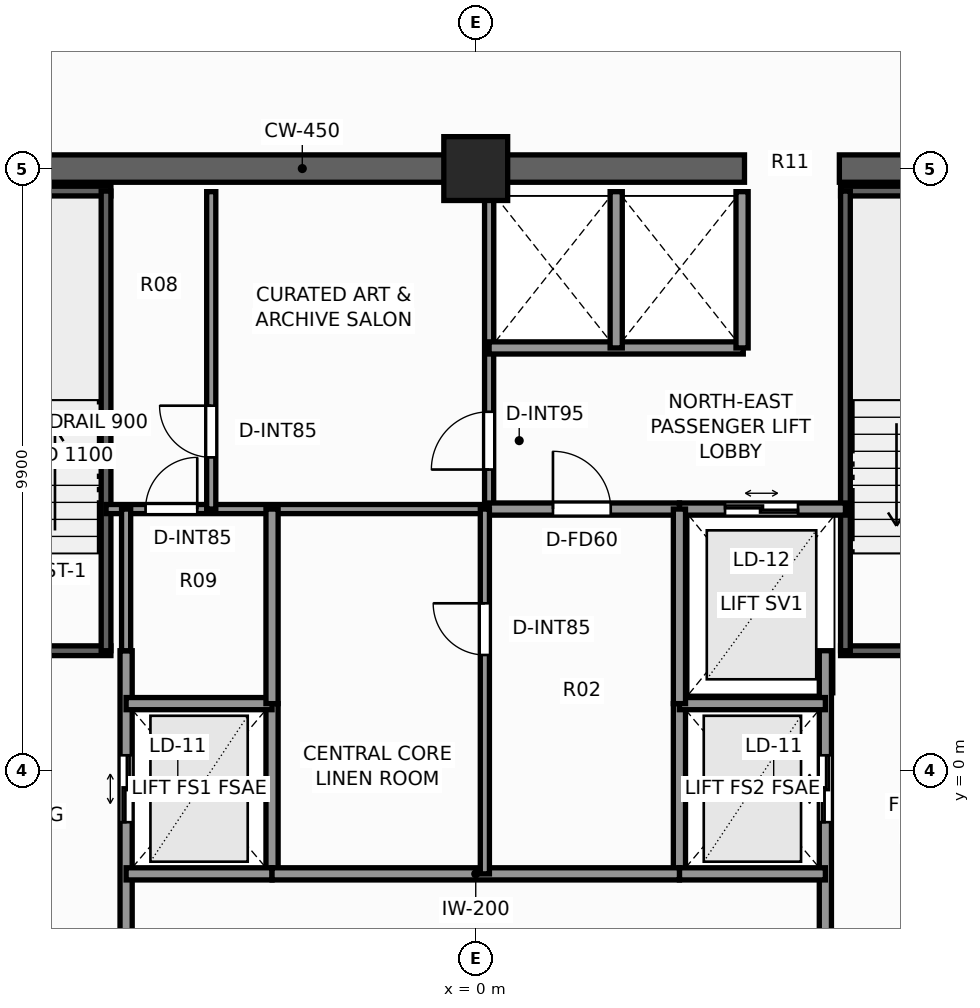
"""IFC4 building model, lengths in metres.
Left out: names, types, materials, properties, quantities, classifications, styles, units other than length and angle.
Written with IfcOpenShell. Run it as: python <this file> out.ifc"""

import sys

from ifc_helpers import new_model, si_unit, direction, frame, frame_2d, origin, origin_2d, place, context, subcontext, project, spatial, rectangle, extrude, element, fill, save


model = new_model("IFC4")
c1 = context("Model", 3, precision=1e-05, world=origin(), true_north=direction((0.0, 1.0)))
c2 = subcontext(c1, "Body", "Model", "MODEL_VIEW")
j1 = project(units=[si_unit("LENGTHUNIT", "METRE"), si_unit("PLANEANGLEUNIT", "RADIAN")], contexts=[c1])
p1 = place(None, origin())
s1 = spatial("IfcSite", under=j1, at=p1, CompositionType="ELEMENT")
p2 = place(p1, origin())
s2 = spatial("IfcBuilding", under=s1, at=p2, CompositionType="ELEMENT")
p3 = place(p2, frame((0.0, 0.0, 226.2)))
s3 = spatial("IfcBuildingStorey", under=s2, at=p3, CompositionType="ELEMENT", Elevation=226.2)
p4 = place(p3, frame((-10.125, 9.9, 0.0), z_axis=(0.0, 0.0, 1.0), x_axis=(1.0, 0.0, 0.0)))
e1 = element("IfcWall", 1, at=p4, inside=s3, PredefinedType="SHEAR", context=c2, shape_type="SweptSolid", body=[
    extrude(rectangle(XDim=14.545, YDim=0.45, at=frame_2d((7.272, 0.0))), origin(), (0.0, 0.0, 1.0), 3.3),
])
p5 = place(p3, frame((5.98, 9.9, 0.0), z_axis=(0.0, 0.0, 1.0), x_axis=(1.0, 0.0, 0.0)))
e2 = element("IfcWall", 2, at=p5, inside=s3, PredefinedType="SHEAR", context=c2, shape_type="SweptSolid", body=[
    extrude(rectangle(XDim=4.145, YDim=0.45, at=frame_2d((2.073, 0.0))), origin(), (0.0, 0.0, 1.0), 3.3),
])
p6 = place(p3, frame((0.0, 9.9, 0.0), z_axis=(0.0, 0.0, 1.0), x_axis=(1.0, 0.0, 0.0)))
e3 = element("IfcColumn", 3, at=p6, inside=s3, PredefinedType="COLUMN", context=c2, shape_type="SweptSolid", body=[
    extrude(rectangle(XDim=1.05, YDim=1.05, at=origin_2d()), origin(), (0.0, 0.0, 1.0), 3.3),
])
p7 = place(p3, frame((-9.52, 1.97, 0.0), z_axis=(0.0, 0.0, 1.0), x_axis=(1.0, 0.0, 0.0)))
e4 = element("IfcWall", 4, at=p7, inside=s3, PredefinedType="SHEAR", context=c2, shape_type="SweptSolid", body=[
    extrude(rectangle(XDim=3.52, YDim=0.16, at=frame_2d((1.76, 0.0))), origin(), (0.0, 0.0, 1.0), 3.3),
])
p8 = place(p7, frame((1.15, 0.0, 0.0)))
e5 = element("IfcOpeningElement", 5, at=p8, cuts=e4, PredefinedType="OPENING", context=c2, shape_type="SweptSolid", body=[
    extrude(rectangle(XDim=1.1, YDim=2.2, at=frame_2d((0.55, 1.1))), frame((0.0, 0.09, 0.0), z_axis=(0.0, -1.0, 0.0), x_axis=(1.0, 0.0, 0.0)), (0.0, 0.0, 1.0), 0.18),
])
p9 = place(p3, frame((-9.52, 9.53, 0.0), z_axis=(0.0, 0.0, 1.0), x_axis=(1.0, 0.0, 0.0)))
e6 = element("IfcWall", 6, at=p9, inside=s3, PredefinedType="SHEAR", context=c2, shape_type="SweptSolid", body=[
    extrude(rectangle(XDim=3.52, YDim=0.16, at=frame_2d((1.76, 0.0))), origin(), (0.0, 0.0, 1.0), 3.3),
])
p10 = place(p3, frame((-6.08, 1.97, 0.0), z_axis=(0.0, 0.0, 1.0), x_axis=(0.0, 1.0, 0.0)))
e7 = element("IfcWall", 7, at=p10, inside=s3, PredefinedType="SHEAR", context=c2, shape_type="SweptSolid", body=[
    extrude(rectangle(XDim=7.56, YDim=0.16, at=frame_2d((3.78, 0.0))), origin(), (0.0, 0.0, 1.0), 3.3),
])
p11 = place(p3, frame((6.0, 1.97, 0.0), z_axis=(0.0, 0.0, 1.0), x_axis=(1.0, 0.0, 0.0)))
e8 = element("IfcWall", 8, at=p11, inside=s3, PredefinedType="SHEAR", context=c2, shape_type="SweptSolid", body=[
    extrude(rectangle(XDim=3.52, YDim=0.16, at=frame_2d((1.76, 0.0))), origin(), (0.0, 0.0, 1.0), 3.3),
])
p12 = place(p11, frame((1.15, 0.0, 0.0)))
e9 = element("IfcOpeningElement", 9, at=p12, cuts=e8, PredefinedType="OPENING", context=c2, shape_type="SweptSolid", body=[
    extrude(rectangle(XDim=1.1, YDim=2.2, at=frame_2d((0.55, 1.1))), frame((0.0, 0.09, 0.0), z_axis=(0.0, -1.0, 0.0), x_axis=(1.0, 0.0, 0.0)), (0.0, 0.0, 1.0), 0.18),
])
p13 = place(p3, frame((6.0, 9.53, 0.0), z_axis=(0.0, 0.0, 1.0), x_axis=(1.0, 0.0, 0.0)))
e10 = element("IfcWall", 10, at=p13, inside=s3, PredefinedType="SHEAR", context=c2, shape_type="SweptSolid", body=[
    extrude(rectangle(XDim=3.52, YDim=0.16, at=frame_2d((1.76, 0.0))), origin(), (0.0, 0.0, 1.0), 3.3),
])
p14 = place(p3, frame((6.08, 1.97, 0.0), z_axis=(0.0, 0.0, 1.0), x_axis=(0.0, 1.0, 0.0)))
e11 = element("IfcWall", 11, at=p14, inside=s3, PredefinedType="SHEAR", context=c2, shape_type="SweptSolid", body=[
    extrude(rectangle(XDim=7.56, YDim=0.16, at=frame_2d((3.78, 0.0))), origin(), (0.0, 0.0, 1.0), 3.3),
])
p15 = place(p3, frame((-5.75, -3.6, 0.0), z_axis=(0.0, 0.0, 1.0), x_axis=(0.0, 1.0, 0.0)))
e12 = element("IfcWall", 12, at=p15, inside=s3, PredefinedType="SOLIDWALL", context=c2, shape_type="SweptSolid", body=[
    extrude(rectangle(XDim=5.57, YDim=0.2, at=frame_2d((2.785, 0.0))), origin(), (0.0, 0.0, 1.0), 3.08),
])
p16 = place(p15, frame((2.75, 0.0, 0.0)))
e13 = element("IfcOpeningElement", 13, at=p16, cuts=e12, PredefinedType="OPENING", context=c2, shape_type="SweptSolid", body=[
    extrude(rectangle(XDim=1.1, YDim=2.2, at=frame_2d((0.55, 1.1))), frame((0.0, 0.11, 0.0), z_axis=(0.0, -1.0, 0.0), x_axis=(1.0, 0.0, 0.0)), (0.0, 0.0, 1.0), 0.22),
])
p17 = place(p3, frame((-3.35, -1.7, 0.0), z_axis=(0.0, 0.0, 1.0), x_axis=(0.0, 1.0, 0.0)))
e14 = element("IfcWall", 14, at=p17, inside=s3, PredefinedType="SOLIDWALL", context=c2, shape_type="SweptSolid", body=[
    extrude(rectangle(XDim=2.8, YDim=0.2, at=frame_2d((1.4, 0.0))), origin(), (0.0, 0.0, 1.0), 3.08),
])
for number, where, z_axis, x_axis in (
    (15, (-5.75, -1.7, 0.0), (0.0, 0.0, 1.0), (1.0, 0.0, 0.0)),
    (16, (-5.75, 1.1, 0.0), (0.0, 0.0, 1.0), (1.0, 0.0, 0.0)),
):
    element("IfcWall", number, at=place(p3, frame(where, z_axis=z_axis, x_axis=x_axis)), inside=s3, PredefinedType="SOLIDWALL", context=c2, shape_type="SweptSolid", body=[
        extrude(rectangle(XDim=2.4, YDim=0.2, at=frame_2d((1.2, 0.0))), origin(), (0.0, 0.0, 1.0), 3.08),
    ])
p18 = place(p3, frame((5.75, -3.6, 0.0), z_axis=(0.0, 0.0, 1.0), x_axis=(0.0, 1.0, 0.0)))
e17 = element("IfcWall", 17, at=p18, inside=s3, PredefinedType="SOLIDWALL", context=c2, shape_type="SweptSolid", body=[
    extrude(rectangle(XDim=5.57, YDim=0.2, at=frame_2d((2.785, 0.0))), origin(), (0.0, 0.0, 1.0), 3.08),
])
p19 = place(p18, frame((2.75, 0.0, 0.0)))
e18 = element("IfcOpeningElement", 18, at=p19, cuts=e17, PredefinedType="OPENING", context=c2, shape_type="SweptSolid", body=[
    extrude(rectangle(XDim=1.1, YDim=2.2, at=frame_2d((0.55, 1.1))), frame((0.0, 0.11, 0.0), z_axis=(0.0, -1.0, 0.0), x_axis=(1.0, 0.0, 0.0)), (0.0, 0.0, 1.0), 0.22),
])
p20 = place(p3, frame((3.35, -1.7, 0.0), z_axis=(0.0, 0.0, 1.0), x_axis=(0.0, 1.0, 0.0)))
e19 = element("IfcWall", 19, at=p20, inside=s3, PredefinedType="SOLIDWALL", context=c2, shape_type="SweptSolid", body=[
    extrude(rectangle(XDim=2.8, YDim=0.2, at=frame_2d((1.4, 0.0))), origin(), (0.0, 0.0, 1.0), 3.08),
])
for number, where, z_axis, x_axis in (
    (20, (3.35, -1.7, 0.0), (0.0, 0.0, 1.0), (1.0, 0.0, 0.0)),
    (21, (3.35, 1.1, 0.0), (0.0, 0.0, 1.0), (1.0, 0.0, 0.0)),
):
    element("IfcWall", number, at=place(p3, frame(where, z_axis=z_axis, x_axis=x_axis)), inside=s3, PredefinedType="SOLIDWALL", context=c2, shape_type="SweptSolid", body=[
        extrude(rectangle(XDim=2.4, YDim=0.2, at=frame_2d((1.2, 0.0))), origin(), (0.0, 0.0, 1.0), 3.08),
    ])
p21 = place(p3, frame((3.35, 4.3, 0.0), z_axis=(0.0, 0.0, 1.0), x_axis=(1.0, 0.0, 0.0)))
e22 = element("IfcWall", 22, at=p21, inside=s3, PredefinedType="SOLIDWALL", context=c2, shape_type="SweptSolid", body=[
    extrude(rectangle(XDim=2.73, YDim=0.2, at=frame_2d((1.365, 0.0))), origin(), (0.0, 0.0, 1.0), 3.08),
])
p22 = place(p21, frame((0.75, 0.0, 0.0)))
e23 = element("IfcOpeningElement", 23, at=p22, cuts=e22, PredefinedType="OPENING", context=c2, shape_type="SweptSolid", body=[
    extrude(rectangle(XDim=1.2, YDim=2.25, at=frame_2d((0.6, 1.125))), frame((0.0, 0.11, 0.0), z_axis=(0.0, -1.0, 0.0), x_axis=(1.0, 0.0, 0.0)), (0.0, 0.0, 1.0), 0.22),
])
p23 = place(p3, frame((-6.08, 4.3, 0.0), z_axis=(0.0, 0.0, 1.0), x_axis=(1.0, 0.0, 0.0)))
e24 = element("IfcWall", 24, at=p23, inside=s3, PredefinedType="PARTITIONING", context=c2, shape_type="SweptSolid", body=[
    extrude(rectangle(XDim=6.3, YDim=0.15, at=frame_2d((3.15, 0.0))), origin(), (0.0, 0.0, 1.0), 3.08),
])
p24 = place(p23, frame((0.65, 0.0, 0.0)))
e25 = element("IfcOpeningElement", 25, at=p24, cuts=e24, PredefinedType="OPENING", context=c2, shape_type="SweptSolid", body=[
    extrude(rectangle(XDim=0.85, YDim=2.03, at=frame_2d((0.425, 1.015))), frame((0.0, 0.085, 0.0), z_axis=(0.0, -1.0, 0.0), x_axis=(1.0, 0.0, 0.0)), (0.0, 0.0, 1.0), 0.17),
])
p25 = place(p3, frame((0.22, 4.3, 0.0), z_axis=(0.0, 0.0, 1.0), x_axis=(0.0, 1.0, 0.0)))
e26 = element("IfcWall", 26, at=p25, inside=s3, PredefinedType="PARTITIONING", context=c2, shape_type="SweptSolid", body=[
    extrude(rectangle(XDim=5.22, YDim=0.15, at=frame_2d((2.61, 0.0))), origin(), (0.0, 0.0, 1.0), 3.08),
])
p26 = place(p25, frame((0.65, 0.0, 0.0)))
e27 = element("IfcOpeningElement", 27, at=p26, cuts=e26, PredefinedType="OPENING", context=c2, shape_type="SweptSolid", body=[
    extrude(rectangle(XDim=0.95, YDim=2.06, at=frame_2d((0.475, 1.03))), frame((0.0, 0.085, 0.0), z_axis=(0.0, -1.0, 0.0), x_axis=(1.0, 0.0, 0.0)), (0.0, 0.0, 1.0), 0.17),
])
p27 = place(p3, frame((-4.35, 4.3, 0.0), z_axis=(0.0, 0.0, 1.0), x_axis=(0.0, 1.0, 0.0)))
e28 = element("IfcWall", 28, at=p27, inside=s3, PredefinedType="PARTITIONING", context=c2, shape_type="SweptSolid", body=[
    extrude(rectangle(XDim=5.22, YDim=0.15, at=frame_2d((2.61, 0.0))), origin(), (0.0, 0.0, 1.0), 3.08),
])
p28 = place(p27, frame((0.85, 0.0, 0.0)))
e29 = element("IfcOpeningElement", 29, at=p28, cuts=e28, PredefinedType="OPENING", context=c2, shape_type="SweptSolid", body=[
    extrude(rectangle(XDim=0.85, YDim=2.03, at=frame_2d((0.425, 1.015))), frame((0.0, 0.085, 0.0), z_axis=(0.0, -1.0, 0.0), x_axis=(1.0, 0.0, 0.0)), (0.0, 0.0, 1.0), 0.17),
])
p29 = place(p3, frame((0.22, 6.95, 0.0), z_axis=(0.0, 0.0, 1.0), x_axis=(1.0, 0.0, 0.0)))
e30 = element("IfcWall", 30, at=p29, inside=s3, PredefinedType="SOLIDWALL", context=c2, shape_type="SweptSolid", body=[
    extrude(rectangle(XDim=4.18, YDim=0.2, at=frame_2d((2.09, 0.0))), origin(), (0.0, 0.0, 1.0), 3.08),
])
for number, where, z_axis, x_axis in (
    (31, (4.38, 6.95, 0.0), (0.0, 0.0, 1.0), (0.0, 1.0, 0.0)),
    (32, (2.31, 6.95, 0.0), (0.0, 0.0, 1.0), (0.0, 1.0, 0.0)),
):
    element("IfcWall", number, at=place(p3, frame(where, z_axis=z_axis, x_axis=x_axis)), inside=s3, PredefinedType="SOLIDWALL", context=c2, shape_type="SweptSolid", body=[
        extrude(rectangle(XDim=2.57, YDim=0.2, at=frame_2d((1.285, 0.0))), origin(), (0.0, 0.0, 1.0), 3.08),
    ])
p30 = place(p3, frame((0.22, 4.3, 0.0), z_axis=(0.0, 0.0, 1.0), x_axis=(1.0, 0.0, 0.0)))
e33 = element("IfcWall", 33, at=p30, inside=s3, PredefinedType="SOLIDWALL", context=c2, shape_type="SweptSolid", body=[
    extrude(rectangle(XDim=3.13, YDim=0.2, at=frame_2d((1.565, 0.0))), origin(), (0.0, 0.0, 1.0), 3.08),
])
p31 = place(p30, frame((1.05, 0.0, 0.0)))
e34 = element("IfcOpeningElement", 34, at=p31, cuts=e33, PredefinedType="OPENING", context=c2, shape_type="SweptSolid", body=[
    extrude(rectangle(XDim=0.95, YDim=2.06, at=frame_2d((0.475, 1.03))), frame((0.0, 0.11, 0.0), z_axis=(0.0, -1.0, 0.0), x_axis=(1.0, 0.0, 0.0)), (0.0, 0.0, 1.0), 0.22),
])
p32 = place(p3, frame((-3.35, -1.7, 0.0), z_axis=(0.0, 0.0, 1.0), x_axis=(1.0, 0.0, 0.0)))
e35 = element("IfcWall", 35, at=p32, inside=s3, PredefinedType="SOLIDWALL", context=c2, shape_type="SweptSolid", body=[
    extrude(rectangle(XDim=6.7, YDim=0.2, at=frame_2d((3.35, 0.0))), origin(), (0.0, 0.0, 1.0), 3.08),
])
for number, where, z_axis, x_axis in (
    (36, (-3.35, 1.1, 0.0), (0.0, 0.0, 1.0), (0.0, 1.0, 0.0)),
    (37, (3.35, 1.1, 0.0), (0.0, 0.0, 1.0), (0.0, 1.0, 0.0)),
):
    element("IfcWall", number, at=place(p3, frame(where, z_axis=z_axis, x_axis=x_axis)), inside=s3, PredefinedType="SOLIDWALL", context=c2, shape_type="SweptSolid", body=[
        extrude(rectangle(XDim=3.2, YDim=0.2, at=frame_2d((1.6, 0.0))), origin(), (0.0, 0.0, 1.0), 3.08),
    ])
p33 = place(p3, frame((0.15, -1.7, 0.0), z_axis=(0.0, 0.0, 1.0), x_axis=(0.0, 1.0, 0.0)))
e38 = element("IfcWall", 38, at=p33, inside=s3, PredefinedType="PARTITIONING", context=c2, shape_type="SweptSolid", body=[
    extrude(rectangle(XDim=6.0, YDim=0.15, at=frame_2d((3.0, 0.0))), origin(), (0.0, 0.0, 1.0), 3.08),
])
p34 = place(p33, frame((3.6, 0.0, 0.0)))
e39 = element("IfcOpeningElement", 39, at=p34, cuts=e38, PredefinedType="OPENING", context=c2, shape_type="SweptSolid", body=[
    extrude(rectangle(XDim=0.85, YDim=2.03, at=frame_2d((0.425, 1.015))), frame((0.0, 0.085, 0.0), z_axis=(0.0, -1.0, 0.0), x_axis=(1.0, 0.0, 0.0)), (0.0, 0.0, 1.0), 0.17),
])
p35 = place(p3, frame((-5.75, 1.97, 0.0), z_axis=(0.0, 0.0, 1.0), x_axis=(0.0, 1.0, 0.0)))
e40 = element("IfcWall", 40, at=p35, inside=s3, PredefinedType="PARTITIONING", context=c2, shape_type="SweptSolid", body=[
    extrude(rectangle(XDim=2.33, YDim=0.15, at=frame_2d((1.165, 0.0))), origin(), (0.0, 0.0, 1.0), 3.08),
])
p36 = place(p16, origin())
e41 = element("IfcDoor", 41, at=p36, inside=s3, OperationType="DOUBLE_DOOR_SLIDING", PredefinedType="DOOR", context=c2, shape_type="SweptSolid", body=[
    extrude(rectangle(XDim=1.1, YDim=2.2, at=frame_2d((0.55, 1.1))), frame((0.0, 0.025, 0.0), z_axis=(0.0, -1.0, 0.0), x_axis=(1.0, 0.0, 0.0)), (0.0, 0.0, 1.0), 0.05),
])
fill(e13, e41)
p37 = place(p19, origin())
e42 = element("IfcDoor", 42, at=p37, inside=s3, OperationType="DOUBLE_DOOR_SLIDING", PredefinedType="DOOR", context=c2, shape_type="SweptSolid", body=[
    extrude(rectangle(XDim=1.1, YDim=2.2, at=frame_2d((0.55, 1.1))), frame((0.0, 0.025, 0.0), z_axis=(0.0, -1.0, 0.0), x_axis=(1.0, 0.0, 0.0)), (0.0, 0.0, 1.0), 0.05),
])
fill(e18, e42)
p38 = place(p22, origin())
e43 = element("IfcDoor", 43, at=p38, inside=s3, OperationType="DOUBLE_DOOR_SLIDING", PredefinedType="DOOR", context=c2, shape_type="SweptSolid", body=[
    extrude(rectangle(XDim=1.2, YDim=2.25, at=frame_2d((0.6, 1.125))), frame((0.0, 0.025, 0.0), z_axis=(0.0, -1.0, 0.0), x_axis=(1.0, 0.0, 0.0)), (0.0, 0.0, 1.0), 0.05),
])
fill(e23, e43)
p39 = place(p26, origin())
e44 = element("IfcDoor", 44, at=p39, inside=s3, OperationType="SINGLE_SWING_LEFT", PredefinedType="DOOR", context=c2, shape_type="SweptSolid", body=[
    extrude(rectangle(XDim=0.95, YDim=2.06, at=frame_2d((0.475, 1.03))), frame((0.0, 0.025, 0.0), z_axis=(0.0, -1.0, 0.0), x_axis=(1.0, 0.0, 0.0)), (0.0, 0.0, 1.0), 0.05),
])
fill(e27, e44)
p40 = place(p28, origin())
e45 = element("IfcDoor", 45, at=p40, inside=s3, OperationType="SINGLE_SWING_RIGHT", PredefinedType="DOOR", context=c2, shape_type="SweptSolid", body=[
    extrude(rectangle(XDim=0.85, YDim=2.03, at=frame_2d((0.425, 1.015))), frame((0.0, 0.025, 0.0), z_axis=(0.0, -1.0, 0.0), x_axis=(1.0, 0.0, 0.0)), (0.0, 0.0, 1.0), 0.05),
])
fill(e29, e45)
p41 = place(p31, origin())
e46 = element("IfcDoor", 46, at=p41, inside=s3, OperationType="SINGLE_SWING_LEFT", PredefinedType="DOOR", context=c2, shape_type="SweptSolid", body=[
    extrude(rectangle(XDim=0.95, YDim=2.06, at=frame_2d((0.475, 1.03))), frame((0.0, 0.025, 0.0), z_axis=(0.0, -1.0, 0.0), x_axis=(1.0, 0.0, 0.0)), (0.0, 0.0, 1.0), 0.05),
])
fill(e34, e46)
p42 = place(p34, origin())
e47 = element("IfcDoor", 47, at=p42, inside=s3, OperationType="SINGLE_SWING_RIGHT", PredefinedType="DOOR", context=c2, shape_type="SweptSolid", body=[
    extrude(rectangle(XDim=0.85, YDim=2.03, at=frame_2d((0.425, 1.015))), frame((0.0, 0.025, 0.0), z_axis=(0.0, -1.0, 0.0), x_axis=(1.0, 0.0, 0.0)), (0.0, 0.0, 1.0), 0.05),
])
fill(e39, e47)
p43 = place(p24, origin())
e48 = element("IfcDoor", 48, at=p43, inside=s3, OperationType="SINGLE_SWING_RIGHT", PredefinedType="DOOR", context=c2, shape_type="SweptSolid", body=[
    extrude(rectangle(XDim=0.85, YDim=2.03, at=frame_2d((0.425, 1.015))), frame((0.0, 0.025, 0.0), z_axis=(0.0, -1.0, 0.0), x_axis=(1.0, 0.0, 0.0)), (0.0, 0.0, 1.0), 0.05),
])
fill(e25, e48)
save(model, sys.argv[1])
